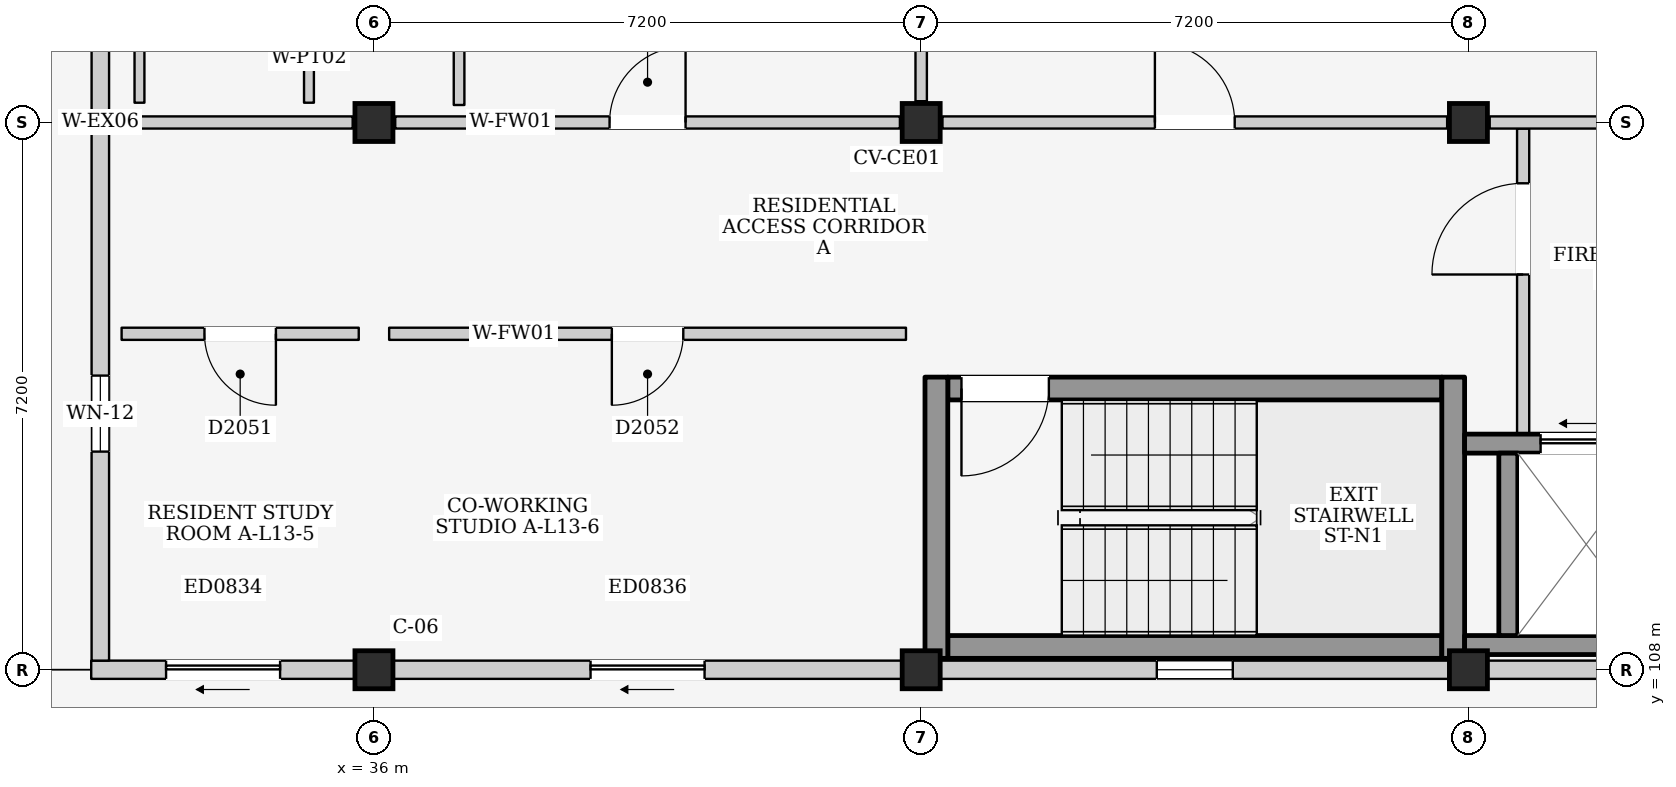
"""IFC4 building model, lengths in metres.
Left out: names, types, materials, properties, quantities, classifications, styles, units other than length and angle.
Written with IfcOpenShell. Run it as: python <this file> out.ifc"""

import sys

from ifc_helpers import new_model, si_unit, direction, frame, frame_2d, origin, origin_2d, place, context, subcontext, project, spatial, rectangle, extrude, element, fill, save


model = new_model("IFC4")
c1 = context("Model", 3, precision=1e-05, world=origin(), true_north=direction((0.0, 1.0)))
c2 = subcontext(c1, "Body", "Model", "MODEL_VIEW")
j1 = project(units=[si_unit("LENGTHUNIT", "METRE"), si_unit("PLANEANGLEUNIT", "RADIAN")], contexts=[c1])
p1 = place(None, origin())
s1 = spatial("IfcSite", under=j1, at=p1, CompositionType="ELEMENT")
p2 = place(p1, origin())
s2 = spatial("IfcBuilding", under=s1, at=p2, CompositionType="ELEMENT")
p3 = place(p2, frame((0.0, 0.0, 44.4)))
s3 = spatial("IfcBuildingStorey", under=s2, at=p3, CompositionType="ELEMENT", Elevation=44.4)
for number, where, z_axis, x_axis in (
    (1, (36.0, 108.0, 0.0), (0.0, 0.0, 1.0), (1.0, 0.0, 0.0)),
    (2, (36.0, 115.2, 0.0), (0.0, 0.0, 1.0), (1.0, 0.0, 0.0)),
    (3, (43.2, 108.0, 0.0), (0.0, 0.0, 1.0), (1.0, 0.0, 0.0)),
    (4, (43.2, 115.2, 0.0), (0.0, 0.0, 1.0), (1.0, 0.0, 0.0)),
    (5, (50.4, 108.0, 0.0), (0.0, 0.0, 1.0), (1.0, 0.0, 0.0)),
    (6, (50.4, 115.2, 0.0), (0.0, 0.0, 1.0), (1.0, 0.0, 0.0)),
):
    element("IfcColumn", number, at=place(p3, frame(where, z_axis=z_axis, x_axis=x_axis)), inside=s3, PredefinedType="COLUMN", context=c2, shape_type="SweptSolid", body=[
        extrude(rectangle(XDim=0.5, YDim=0.5, at=origin_2d()), origin(), (0.0, 0.0, 1.0), 3.3),
    ])
p4 = place(p3, frame((32.28, 108.0, 0.0), z_axis=(0.0, 0.0, 1.0), x_axis=(1.0, 0.0, 0.0)))
e7 = element("IfcWall", 7, at=p4, inside=s3, PredefinedType="ELEMENTEDWALL", context=c2, shape_type="SweptSolid", body=[
    extrude(rectangle(XDim=3.47, YDim=0.24, at=frame_2d((1.735, 0.0))), origin(), (0.0, 0.0, 1.0), 2.415),
])
p5 = place(p4, frame((0.985, 0.0, 0.0)))
e8 = element("IfcOpeningElement", 8, at=p5, cuts=e7, PredefinedType="OPENING", context=c2, shape_type="SweptSolid", body=[
    extrude(rectangle(XDim=1.5, YDim=2.12, at=frame_2d((0.75, 1.06))), frame((0.0, 0.135, 0.0), z_axis=(0.0, -1.0, 0.0), x_axis=(1.0, 0.0, 0.0)), (0.0, 0.0, 1.0), 0.27),
])
p6 = place(p3, frame((36.25, 108.0, 0.0), z_axis=(0.0, 0.0, 1.0), x_axis=(1.0, 0.0, 0.0)))
e9 = element("IfcWall", 9, at=p6, inside=s3, PredefinedType="ELEMENTEDWALL", context=c2, shape_type="SweptSolid", body=[
    extrude(rectangle(XDim=6.7, YDim=0.24, at=frame_2d((3.35, 0.0))), origin(), (0.0, 0.0, 1.0), 2.415),
])
p7 = place(p6, frame((2.6, 0.0, 0.0)))
e10 = element("IfcOpeningElement", 10, at=p7, cuts=e9, PredefinedType="OPENING", context=c2, shape_type="SweptSolid", body=[
    extrude(rectangle(XDim=1.5, YDim=2.12, at=frame_2d((0.75, 1.06))), frame((0.0, 0.135, 0.0), z_axis=(0.0, -1.0, 0.0), x_axis=(1.0, 0.0, 0.0)), (0.0, 0.0, 1.0), 0.27),
])
p8 = place(p3, frame((43.45, 108.0, 0.0), z_axis=(0.0, 0.0, 1.0), x_axis=(1.0, 0.0, 0.0)))
e11 = element("IfcWall", 11, at=p8, inside=s3, PredefinedType="ELEMENTEDWALL", context=c2, shape_type="SweptSolid", body=[
    extrude(rectangle(XDim=6.7, YDim=0.24, at=frame_2d((3.35, 0.0))), origin(), (0.0, 0.0, 1.0), 2.415),
])
p9 = place(p8, frame((2.85, 0.0, 1.2)))
e12 = element("IfcOpeningElement", 12, at=p9, cuts=e11, PredefinedType="OPENING", context=c2, shape_type="SweptSolid", body=[
    extrude(rectangle(XDim=1.0, YDim=0.9, at=frame_2d((0.5, 0.45))), frame((0.0, 0.135, 0.0), z_axis=(0.0, -1.0, 0.0), x_axis=(1.0, 0.0, 0.0)), (0.0, 0.0, 1.0), 0.27),
])
p10 = place(p3, frame((50.65, 108.0, 0.0), z_axis=(0.0, 0.0, 1.0), x_axis=(1.0, 0.0, 0.0)))
e13 = element("IfcWall", 13, at=p10, inside=s3, PredefinedType="ELEMENTEDWALL", context=c2, shape_type="SweptSolid", body=[
    extrude(rectangle(XDim=6.7, YDim=0.24, at=frame_2d((3.35, 0.0))), origin(), (0.0, 0.0, 1.0), 2.415),
])
p11 = place(p10, frame((2.85, 0.0, 1.2)))
e14 = element("IfcOpeningElement", 14, at=p11, cuts=e13, PredefinedType="OPENING", context=c2, shape_type="SweptSolid", body=[
    extrude(rectangle(XDim=1.0, YDim=0.9, at=frame_2d((0.5, 0.45))), frame((0.0, 0.135, 0.0), z_axis=(0.0, -1.0, 0.0), x_axis=(1.0, 0.0, 0.0)), (0.0, 0.0, 1.0), 0.27),
])
p12 = place(p3, frame((32.4, 108.12, 0.0), z_axis=(0.0, 0.0, 1.0), x_axis=(0.0, 1.0, 0.0)))
e15 = element("IfcWall", 15, at=p12, inside=s3, PredefinedType="ELEMENTEDWALL", context=c2, shape_type="SweptSolid", body=[
    extrude(rectangle(XDim=7.08, YDim=0.23, at=frame_2d((3.54, 0.0))), origin(), (0.0, 0.0, 1.0), 2.515),
])
p13 = place(p12, frame((2.75, 0.0, 1.1)))
e16 = element("IfcOpeningElement", 16, at=p13, cuts=e15, PredefinedType="OPENING", context=c2, shape_type="SweptSolid", body=[
    extrude(rectangle(XDim=1.0, YDim=0.9, at=frame_2d((0.5, 0.45))), frame((0.0, 0.13, 0.0), z_axis=(0.0, -1.0, 0.0), x_axis=(1.0, 0.0, 0.0)), (0.0, 0.0, 1.0), 0.26),
])
p14 = place(p3, frame((32.4, 115.2, 0.0), z_axis=(0.0, 0.0, 1.0), x_axis=(0.0, 1.0, 0.0)))
e17 = element("IfcWall", 17, at=p14, inside=s3, PredefinedType="ELEMENTEDWALL", context=c2, shape_type="SweptSolid", body=[
    extrude(rectangle(XDim=7.08, YDim=0.23, at=frame_2d((3.54, 0.0))), origin(), (0.0, 0.0, 1.0), 2.515),
])
p15 = place(p14, frame((3.6, 0.0, 0.0)))
e18 = element("IfcOpeningElement", 18, at=p15, cuts=e17, PredefinedType="OPENING", context=c2, shape_type="SweptSolid", body=[
    extrude(rectangle(XDim=1.08, YDim=2.12, at=frame_2d((0.54, 1.06))), frame((0.0, 0.13, 0.0), z_axis=(0.0, -1.0, 0.0), x_axis=(1.0, 0.0, 0.0)), (0.0, 0.0, 1.0), 0.26),
])
p16 = place(p3, frame((43.55, 108.3, 0.0), z_axis=(0.0, 0.0, 1.0), x_axis=(1.0, 0.0, 0.0)))
e19 = element("IfcWall", 19, at=p16, inside=s3, PredefinedType="SHEAR", context=c2, shape_type="SweptSolid", body=[
    extrude(rectangle(XDim=6.5, YDim=0.3, at=frame_2d((3.25, 0.0))), origin(), (0.0, 0.0, 1.0), 3.08),
])
p17 = place(p3, frame((43.55, 111.7, 0.0), z_axis=(0.0, 0.0, 1.0), x_axis=(1.0, 0.0, 0.0)))
e20 = element("IfcWall", 20, at=p17, inside=s3, PredefinedType="SHEAR", context=c2, shape_type="SweptSolid", body=[
    extrude(rectangle(XDim=6.5, YDim=0.3, at=frame_2d((3.25, 0.0))), origin(), (0.0, 0.0, 1.0), 3.08),
])
p18 = place(p17, frame((0.18, 0.0, 0.0)))
e21 = element("IfcOpeningElement", 21, at=p18, cuts=e20, PredefinedType="OPENING", context=c2, shape_type="SweptSolid", body=[
    extrude(rectangle(XDim=1.15, YDim=2.2, at=frame_2d((0.575, 1.1))), frame((0.0, 0.165, 0.0), z_axis=(0.0, -1.0, 0.0), x_axis=(1.0, 0.0, 0.0)), (0.0, 0.0, 1.0), 0.33),
])
for number, where, z_axis, x_axis in (
    (22, (43.4, 108.15, 0.0), (0.0, 0.0, 1.0), (0.0, 1.0, 0.0)),
    (23, (50.2, 108.15, 0.0), (0.0, 0.0, 1.0), (0.0, 1.0, 0.0)),
):
    element("IfcWall", number, at=place(p3, frame(where, z_axis=z_axis, x_axis=x_axis)), inside=s3, PredefinedType="SHEAR", context=c2, shape_type="SweptSolid", body=[
        extrude(rectangle(XDim=3.7, YDim=0.3, at=frame_2d((1.85, 0.0))), origin(), (0.0, 0.0, 1.0), 3.08),
    ])
p19 = place(p3, frame((51.12, 111.1, 0.0), z_axis=(0.0, 0.0, 1.0), x_axis=(0.0, 1.0, 0.0)))
e24 = element("IfcWall", 24, at=p19, inside=s3, PredefinedType="PARTITIONING", context=c2, shape_type="SweptSolid", body=[
    extrude(rectangle(XDim=4.02, YDim=0.16, at=frame_2d((2.01, 0.0))), origin(), (0.0, 0.0, 1.0), 3.08),
])
p20 = place(p19, frame((2.1, 0.0, 0.0)))
e25 = element("IfcOpeningElement", 25, at=p20, cuts=e24, PredefinedType="OPENING", context=c2, shape_type="SweptSolid", body=[
    extrude(rectangle(XDim=1.2, YDim=2.2, at=frame_2d((0.6, 1.1))), frame((0.0, 0.095, 0.0), z_axis=(0.0, -1.0, 0.0), x_axis=(1.0, 0.0, 0.0)), (0.0, 0.0, 1.0), 0.19),
])
p21 = place(p3, frame((50.35, 108.325, 0.0), z_axis=(0.0, 0.0, 1.0), x_axis=(1.0, 0.0, 0.0)))
e26 = element("IfcWall", 26, at=p21, inside=s3, PredefinedType="SHEAR", context=c2, shape_type="SweptSolid", body=[
    extrude(rectangle(XDim=2.675, YDim=0.25, at=frame_2d((1.337, 0.0))), origin(), (0.0, 0.0, 1.0), 3.08),
])
p22 = place(p3, frame((50.35, 110.975, 0.0), z_axis=(0.0, 0.0, 1.0), x_axis=(1.0, 0.0, 0.0)))
e27 = element("IfcWall", 27, at=p22, inside=s3, PredefinedType="SHEAR", context=c2, shape_type="SweptSolid", body=[
    extrude(rectangle(XDim=2.675, YDim=0.25, at=frame_2d((1.337, 0.0))), origin(), (0.0, 0.0, 1.0), 3.08),
])
p23 = place(p22, frame((1.0, 0.0, 0.0)))
e28 = element("IfcOpeningElement", 28, at=p23, cuts=e27, PredefinedType="OPENING", context=c2, shape_type="SweptSolid", body=[
    extrude(rectangle(XDim=1.2, YDim=2.25, at=frame_2d((0.6, 1.125))), frame((0.0, 0.14, 0.0), z_axis=(0.0, -1.0, 0.0), x_axis=(1.0, 0.0, 0.0)), (0.0, 0.0, 1.0), 0.28),
])
p24 = place(p3, frame((50.925, 108.45, 0.0), z_axis=(0.0, 0.0, 1.0), x_axis=(0.0, 1.0, 0.0)))
e29 = element("IfcWall", 29, at=p24, inside=s3, PredefinedType="SHEAR", context=c2, shape_type="SweptSolid", body=[
    extrude(rectangle(XDim=2.4, YDim=0.25, at=frame_2d((1.2, 0.0))), origin(), (0.0, 0.0, 1.0), 3.08),
])
p25 = place(p3, frame((32.68, 115.2, 0.0), z_axis=(0.0, 0.0, 1.0), x_axis=(1.0, 0.0, 0.0)))
e30 = element("IfcWall", 30, at=p25, inside=s3, PredefinedType="PARTITIONING", context=c2, shape_type="SweptSolid", body=[
    extrude(rectangle(XDim=3.04, YDim=0.16, at=frame_2d((1.52, 0.0))), origin(), (0.0, 0.0, 1.0), 2.415),
])
p26 = place(p3, frame((36.28, 115.2, 0.0), z_axis=(0.0, 0.0, 1.0), x_axis=(1.0, 0.0, 0.0)))
e31 = element("IfcWall", 31, at=p26, inside=s3, PredefinedType="PARTITIONING", context=c2, shape_type="SweptSolid", body=[
    extrude(rectangle(XDim=6.64, YDim=0.16, at=frame_2d((3.32, 0.0))), origin(), (0.0, 0.0, 1.0), 2.415),
])
p27 = place(p26, frame((2.82, 0.0, 0.0)))
e32 = element("IfcOpeningElement", 32, at=p27, cuts=e31, PredefinedType="OPENING", context=c2, shape_type="SweptSolid", body=[
    extrude(rectangle(XDim=1.0, YDim=2.15, at=frame_2d((0.5, 1.075))), frame((0.0, 0.095, 0.0), z_axis=(0.0, -1.0, 0.0), x_axis=(1.0, 0.0, 0.0)), (0.0, 0.0, 1.0), 0.19),
])
p28 = place(p3, frame((43.2, 115.48, 0.0), z_axis=(0.0, 0.0, 1.0), x_axis=(0.0, 1.0, 0.0)))
e33 = element("IfcWall", 33, at=p28, inside=s3, PredefinedType="PARTITIONING", context=c2, shape_type="SweptSolid", body=[
    extrude(rectangle(XDim=6.64, YDim=0.15, at=frame_2d((3.32, 0.0))), origin(), (0.0, 0.0, 1.0), 2.565),
])
for number, where, z_axis, x_axis in (
    (34, (35.145, 115.46, 0.0), (0.0, 0.0, 1.0), (0.0, 1.0, 0.0)),
    (35, (32.915, 115.46, 0.0), (0.0, 0.0, 1.0), (0.0, 1.0, 0.0)),
):
    element("IfcWall", number, at=place(p3, frame(where, z_axis=z_axis, x_axis=x_axis)), inside=s3, PredefinedType="PARTITIONING", context=c2, shape_type="SweptSolid", body=[
        extrude(rectangle(XDim=2.13, YDim=0.13, at=frame_2d((1.065, 0.0))), origin(), (0.0, 0.0, 1.0), 3.08),
    ])
p29 = place(p3, frame((37.12, 115.43, 0.0), z_axis=(0.0, 0.0, 1.0), x_axis=(0.0, 1.0, 0.0)))
e36 = element("IfcWall", 36, at=p29, inside=s3, PredefinedType="PARTITIONING", context=c2, shape_type="SweptSolid", body=[
    extrude(rectangle(XDim=2.15, YDim=0.14, at=frame_2d((1.075, 0.0))), origin(), (0.0, 0.0, 1.0), 3.08),
])
p30 = place(p3, frame((43.48, 115.2, 0.0), z_axis=(0.0, 0.0, 1.0), x_axis=(1.0, 0.0, 0.0)))
e37 = element("IfcWall", 37, at=p30, inside=s3, PredefinedType="PARTITIONING", context=c2, shape_type="SweptSolid", body=[
    extrude(rectangle(XDim=6.64, YDim=0.16, at=frame_2d((3.32, 0.0))), origin(), (0.0, 0.0, 1.0), 2.415),
])
p31 = place(p30, frame((2.795, 0.0, 0.0)))
e38 = element("IfcOpeningElement", 38, at=p31, cuts=e37, PredefinedType="OPENING", context=c2, shape_type="SweptSolid", body=[
    extrude(rectangle(XDim=1.05, YDim=2.2, at=frame_2d((0.525, 1.1))), frame((0.0, 0.095, 0.0), z_axis=(0.0, -1.0, 0.0), x_axis=(1.0, 0.0, 0.0)), (0.0, 0.0, 1.0), 0.19),
])
p32 = place(p3, frame((50.68, 115.2, 0.0), z_axis=(0.0, 0.0, 1.0), x_axis=(1.0, 0.0, 0.0)))
e39 = element("IfcWall", 39, at=p32, inside=s3, PredefinedType="PARTITIONING", context=c2, shape_type="SweptSolid", body=[
    extrude(rectangle(XDim=6.64, YDim=0.16, at=frame_2d((3.32, 0.0))), origin(), (0.0, 0.0, 1.0), 2.415),
])
p33 = place(p3, frame((32.68, 112.42, 0.0), z_axis=(0.0, 0.0, 1.0), x_axis=(1.0, 0.0, 0.0)))
e40 = element("IfcWall", 40, at=p33, inside=s3, PredefinedType="PARTITIONING", context=c2, shape_type="SweptSolid", body=[
    extrude(rectangle(XDim=3.12, YDim=0.16, at=frame_2d((1.56, 0.0))), origin(), (0.0, 0.0, 1.0), 3.08),
])
p34 = place(p33, frame((1.09, 0.0, 0.0)))
e41 = element("IfcOpeningElement", 41, at=p34, cuts=e40, PredefinedType="OPENING", context=c2, shape_type="SweptSolid", body=[
    extrude(rectangle(XDim=0.94, YDim=2.12, at=frame_2d((0.47, 1.06))), frame((0.0, 0.095, 0.0), z_axis=(0.0, -1.0, 0.0), x_axis=(1.0, 0.0, 0.0)), (0.0, 0.0, 1.0), 0.19),
])
p35 = place(p3, frame((36.2, 112.42, 0.0), z_axis=(0.0, 0.0, 1.0), x_axis=(1.0, 0.0, 0.0)))
e42 = element("IfcWall", 42, at=p35, inside=s3, PredefinedType="PARTITIONING", context=c2, shape_type="SweptSolid", body=[
    extrude(rectangle(XDim=6.8, YDim=0.16, at=frame_2d((3.4, 0.0))), origin(), (0.0, 0.0, 1.0), 3.08),
])
p36 = place(p35, frame((2.93, 0.0, 0.0)))
e43 = element("IfcOpeningElement", 43, at=p36, cuts=e42, PredefinedType="OPENING", context=c2, shape_type="SweptSolid", body=[
    extrude(rectangle(XDim=0.94, YDim=2.12, at=frame_2d((0.47, 1.06))), frame((0.0, 0.095, 0.0), z_axis=(0.0, -1.0, 0.0), x_axis=(1.0, 0.0, 0.0)), (0.0, 0.0, 1.0), 0.19),
])
p37 = place(p5, frame((1.5, 0.0, 0.0), z_axis=(0.0, 0.0, 1.0), x_axis=(-1.0, 0.0, 0.0)))
e44 = element("IfcDoor", 44, at=p37, inside=s3, OperationType="SLIDING_TO_LEFT", PredefinedType="DOOR", context=c2, shape_type="SweptSolid", body=[
    extrude(rectangle(XDim=1.5, YDim=2.12, at=frame_2d((0.75, 1.06))), frame((0.0, 0.025, 0.0), z_axis=(0.0, -1.0, 0.0), x_axis=(1.0, 0.0, 0.0)), (0.0, 0.0, 1.0), 0.05),
])
fill(e8, e44)
p38 = place(p7, frame((1.5, 0.0, 0.0), z_axis=(0.0, 0.0, 1.0), x_axis=(-1.0, 0.0, 0.0)))
e45 = element("IfcDoor", 45, at=p38, inside=s3, OperationType="SLIDING_TO_LEFT", PredefinedType="DOOR", context=c2, shape_type="SweptSolid", body=[
    extrude(rectangle(XDim=1.5, YDim=2.12, at=frame_2d((0.75, 1.06))), frame((0.0, 0.025, 0.0), z_axis=(0.0, -1.0, 0.0), x_axis=(1.0, 0.0, 0.0)), (0.0, 0.0, 1.0), 0.05),
])
fill(e10, e45)
p39 = place(p9, origin())
e46 = element("IfcWindow", 46, at=p39, inside=s3, PartitioningType="SINGLE_PANEL", PredefinedType="WINDOW", context=c2, shape_type="SweptSolid", body=[
    extrude(rectangle(XDim=1.0, YDim=0.9, at=frame_2d((0.5, 0.45))), frame((0.0, 0.03, 0.0), z_axis=(0.0, -1.0, 0.0), x_axis=(1.0, 0.0, 0.0)), (0.0, 0.0, 1.0), 0.06),
])
fill(e12, e46)
p40 = place(p13, origin())
e47 = element("IfcWindow", 47, at=p40, inside=s3, PartitioningType="SINGLE_PANEL", PredefinedType="WINDOW", context=c2, shape_type="SweptSolid", body=[
    extrude(rectangle(XDim=1.0, YDim=0.9, at=frame_2d((0.5, 0.45))), frame((0.0, 0.03, 0.0), z_axis=(0.0, -1.0, 0.0), x_axis=(1.0, 0.0, 0.0)), (0.0, 0.0, 1.0), 0.06),
])
fill(e16, e47)
p41 = place(p18, frame((1.15, 0.0, 0.0), z_axis=(0.0, 0.0, 1.0), x_axis=(-1.0, 0.0, 0.0)))
e48 = element("IfcDoor", 48, at=p41, inside=s3, OperationType="SINGLE_SWING_RIGHT", PredefinedType="DOOR", context=c2, shape_type="SweptSolid", body=[
    extrude(rectangle(XDim=1.15, YDim=2.2, at=frame_2d((0.575, 1.1))), frame((0.0, 0.025, 0.0), z_axis=(0.0, -1.0, 0.0), x_axis=(1.0, 0.0, 0.0)), (0.0, 0.0, 1.0), 0.05),
])
fill(e21, e48)
p42 = place(p20, origin())
e49 = element("IfcDoor", 49, at=p42, inside=s3, OperationType="SINGLE_SWING_LEFT", PredefinedType="DOOR", context=c2, shape_type="SweptSolid", body=[
    extrude(rectangle(XDim=1.2, YDim=2.2, at=frame_2d((0.6, 1.1))), frame((0.0, 0.025, 0.0), z_axis=(0.0, -1.0, 0.0), x_axis=(1.0, 0.0, 0.0)), (0.0, 0.0, 1.0), 0.05),
])
fill(e25, e49)
p43 = place(p23, origin())
e50 = element("IfcDoor", 50, at=p43, inside=s3, OperationType="SLIDING_TO_LEFT", PredefinedType="DOOR", context=c2, shape_type="SweptSolid", body=[
    extrude(rectangle(XDim=1.2, YDim=2.25, at=frame_2d((0.6, 1.125))), frame((0.0, 0.025, 0.0), z_axis=(0.0, -1.0, 0.0), x_axis=(1.0, 0.0, 0.0)), (0.0, 0.0, 1.0), 0.05),
])
fill(e28, e50)
p44 = place(p27, origin())
e51 = element("IfcDoor", 51, at=p44, inside=s3, OperationType="SINGLE_SWING_RIGHT", PredefinedType="DOOR", context=c2, shape_type="SweptSolid", body=[
    extrude(rectangle(XDim=1.0, YDim=2.15, at=frame_2d((0.5, 1.075))), frame((0.0, 0.025, 0.0), z_axis=(0.0, -1.0, 0.0), x_axis=(1.0, 0.0, 0.0)), (0.0, 0.0, 1.0), 0.05),
])
fill(e32, e51)
p45 = place(p31, origin())
e52 = element("IfcDoor", 52, at=p45, inside=s3, OperationType="SINGLE_SWING_LEFT", PredefinedType="DOOR", context=c2, shape_type="SweptSolid", body=[
    extrude(rectangle(XDim=1.05, YDim=2.2, at=frame_2d((0.525, 1.1))), frame((0.0, 0.025, 0.0), z_axis=(0.0, -1.0, 0.0), x_axis=(1.0, 0.0, 0.0)), (0.0, 0.0, 1.0), 0.05),
])
fill(e38, e52)
p46 = place(p34, frame((0.94, 0.0, 0.0), z_axis=(0.0, 0.0, 1.0), x_axis=(-1.0, 0.0, 0.0)))
e53 = element("IfcDoor", 53, at=p46, inside=s3, OperationType="SINGLE_SWING_LEFT", PredefinedType="DOOR", context=c2, shape_type="SweptSolid", body=[
    extrude(rectangle(XDim=0.94, YDim=2.12, at=frame_2d((0.47, 1.06))), frame((0.0, 0.025, 0.0), z_axis=(0.0, -1.0, 0.0), x_axis=(1.0, 0.0, 0.0)), (0.0, 0.0, 1.0), 0.05),
])
fill(e41, e53)
p47 = place(p36, frame((0.94, 0.0, 0.0), z_axis=(0.0, 0.0, 1.0), x_axis=(-1.0, 0.0, 0.0)))
e54 = element("IfcDoor", 54, at=p47, inside=s3, OperationType="SINGLE_SWING_RIGHT", PredefinedType="DOOR", context=c2, shape_type="SweptSolid", body=[
    extrude(rectangle(XDim=0.94, YDim=2.12, at=frame_2d((0.47, 1.06))), frame((0.0, 0.025, 0.0), z_axis=(0.0, -1.0, 0.0), x_axis=(1.0, 0.0, 0.0)), (0.0, 0.0, 1.0), 0.05),
])
fill(e43, e54)
save(model, sys.argv[1])
